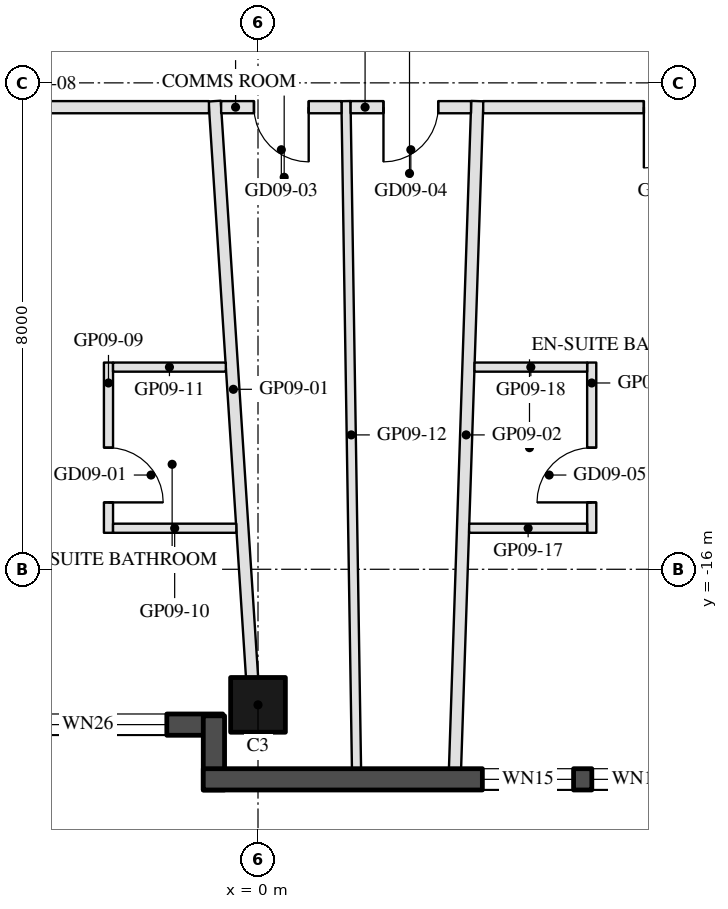
"""IFC4 building model, lengths in metres.
Left out: names, types, materials, properties, quantities, classifications, styles, units other than length and angle.
Written with IfcOpenShell. Run it as: python <this file> out.ifc"""

import sys

from ifc_helpers import new_model, si_unit, direction, frame, frame_2d, origin, origin_2d, place, context, subcontext, project, spatial, rectangle, hollow_rectangle, extrude, element, fill, save


model = new_model("IFC4")
c1 = context("Model", 3, precision=1e-05, world=origin(), true_north=direction((0.0, 1.0)))
c2 = subcontext(c1, "Body", "Model", "MODEL_VIEW")
j1 = project(units=[si_unit("LENGTHUNIT", "METRE"), si_unit("PLANEANGLEUNIT", "RADIAN")], contexts=[c1])
p1 = place(None, origin())
s1 = spatial("IfcSite", under=j1, at=p1, CompositionType="ELEMENT")
p2 = place(p1, origin())
s2 = spatial("IfcBuilding", under=s1, at=p2, CompositionType="ELEMENT")
p3 = place(p2, frame((0.0, 0.0, 113.1)))
s3 = spatial("IfcBuildingStorey", under=s2, at=p3, CompositionType="ELEMENT", Elevation=113.1)
p4 = place(p3, frame((0.0, -18.23, 0.0), z_axis=(0.0, 0.0, 1.0), x_axis=(-1.0, 0.0, 0.0)))
e1 = element("IfcColumn", 1, at=p4, inside=s3, PredefinedType="COLUMN", context=c2, shape_type="SweptSolid", body=[
    extrude(hollow_rectangle(XDim=0.9, YDim=0.9, WallThickness=0.04, at=origin_2d()), origin(), (0.0, 0.0, 1.0), 3.7),
])
p5 = place(p3, frame((-7.32, -18.555, 0.0), z_axis=(0.0, 0.0, 1.0), x_axis=(1.0, 0.0, 0.0)))
e2 = element("IfcWall", 2, at=p5, inside=s3, PredefinedType="SOLIDWALL", context=c2, shape_type="SweptSolid", body=[
    extrude(rectangle(XDim=6.74, YDim=0.35, at=frame_2d((3.37, 0.0))), origin(), (0.0, 0.0, 1.0), 3.55),
])
p6 = place(p5, frame((0.32, 0.0, 0.3)))
e3 = element("IfcOpeningElement", 3, at=p6, cuts=e2, PredefinedType="OPENING", context=c2, shape_type="SweptSolid", body=[
    extrude(rectangle(XDim=2.6, YDim=2.65, at=frame_2d((1.3, 1.325))), frame((0.0, 0.185, 0.0), z_axis=(0.0, -1.0, 0.0), x_axis=(1.0, 0.0, 0.0)), (0.0, 0.0, 1.0), 0.37),
])
p7 = place(p5, frame((3.22, 0.0, 0.3)))
e4 = element("IfcOpeningElement", 4, at=p7, cuts=e2, PredefinedType="OPENING", context=c2, shape_type="SweptSolid", body=[
    extrude(rectangle(XDim=2.6, YDim=2.65, at=frame_2d((1.3, 1.325))), frame((0.0, 0.185, 0.0), z_axis=(0.0, -1.0, 0.0), x_axis=(1.0, 0.0, 0.0)), (0.0, 0.0, 1.0), 0.37),
])
p8 = place(p3, frame((-0.725, -18.41, 0.0), z_axis=(0.0, 0.0, 1.0), x_axis=(0.0, -1.0, 0.0)))
e5 = element("IfcWall", 5, at=p8, inside=s3, PredefinedType="SOLIDWALL", context=c2, shape_type="SweptSolid", body=[
    extrude(rectangle(XDim=1.22, YDim=0.35, at=frame_2d((0.61, 0.0))), origin(), (0.0, 0.0, 1.0), 3.55),
])
p9 = place(p3, frame((-0.9, -19.455, 0.0), z_axis=(0.0, 0.0, 1.0), x_axis=(1.0, 0.0, 0.0)))
e6 = element("IfcWall", 6, at=p9, inside=s3, PredefinedType="SOLIDWALL", context=c2, shape_type="SweptSolid", body=[
    extrude(rectangle(XDim=9.7, YDim=0.35, at=frame_2d((4.85, 0.0))), origin(), (0.0, 0.0, 1.0), 3.55),
])
p10 = place(p9, frame((4.59, 0.0, 0.3)))
e7 = element("IfcOpeningElement", 7, at=p10, cuts=e6, PredefinedType="OPENING", context=c2, shape_type="SweptSolid", body=[
    extrude(rectangle(XDim=1.5, YDim=2.65, at=frame_2d((0.75, 1.325))), frame((0.0, 0.185, 0.0), z_axis=(0.0, -1.0, 0.0), x_axis=(1.0, 0.0, 0.0)), (0.0, 0.0, 1.0), 0.37),
])
p11 = place(p9, frame((6.39, 0.0, 0.3)))
e8 = element("IfcOpeningElement", 8, at=p11, cuts=e6, PredefinedType="OPENING", context=c2, shape_type="SweptSolid", body=[
    extrude(rectangle(XDim=1.5, YDim=2.65, at=frame_2d((0.75, 1.325))), frame((0.0, 0.185, 0.0), z_axis=(0.0, -1.0, 0.0), x_axis=(1.0, 0.0, 0.0)), (0.0, 0.0, 1.0), 0.37),
])
p12 = place(p3, frame((-0.097, -17.78, 0.0), z_axis=(0.0, 0.0, 1.0), x_axis=(-0.064787627283, 0.997899074732, 0.0)))
e9 = element("IfcWall", 9, at=p12, inside=s3, PredefinedType="PARTITIONING", context=c2, shape_type="SweptSolid", body=[
    extrude(rectangle(XDim=9.5, YDim=0.2, at=frame_2d((4.75, 0.0))), origin(), (0.0, 0.0, 1.0), 2.95),
])
p13 = place(p3, frame((3.24, -19.28, 0.0), z_axis=(0.0, 0.0, 1.0), x_axis=(0.033378464475, 0.99944278381, 0.0)))
e10 = element("IfcWall", 10, at=p13, inside=s3, PredefinedType="PARTITIONING", context=c2, shape_type="SweptSolid", body=[
    extrude(rectangle(XDim=10.986, YDim=0.2, at=frame_2d((5.493, 0.0))), origin(), (0.0, 0.0, 1.0), 2.96),
])
p14 = place(p3, frame((-0.807, -8.4, 0.0), z_axis=(0.0, 0.0, 1.0), x_axis=(-1.0, 0.0, 0.0)))
e11 = element("IfcWall", 11, at=p14, inside=s3, PredefinedType="PARTITIONING", context=c2, shape_type="SweptSolid", body=[
    extrude(rectangle(XDim=9.182, YDim=0.2, at=frame_2d((4.591, 0.0))), origin(), (0.0, 0.0, 1.0), 2.95),
])
p15 = place(p14, frame((4.091, 0.0, 0.0)))
e12 = element("IfcOpeningElement", 12, at=p15, cuts=e11, PredefinedType="OPENING", context=c2, shape_type="SweptSolid", body=[
    extrude(rectangle(XDim=1.0, YDim=2.1, at=frame_2d((0.5, 1.05))), frame((0.0, 0.11, 0.0), z_axis=(0.0, -1.0, 0.0), x_axis=(1.0, 0.0, 0.0)), (0.0, 0.0, 1.0), 0.22),
])
p16 = place(p3, frame((-2.459, -12.6, 0.0), z_axis=(0.0, 0.0, 1.0), x_axis=(0.0, -1.0, 0.0)))
e13 = element("IfcWall", 13, at=p16, inside=s3, PredefinedType="PARTITIONING", context=c2, shape_type="SweptSolid", body=[
    extrude(rectangle(XDim=2.8, YDim=0.15, at=frame_2d((1.4, 0.0))), origin(), (0.0, 0.0, 1.0), 3.55),
])
p17 = place(p16, frame((1.4, 0.0, 0.0)))
e14 = element("IfcOpeningElement", 14, at=p17, cuts=e13, PredefinedType="OPENING", context=c2, shape_type="SweptSolid", body=[
    extrude(rectangle(XDim=0.9, YDim=2.1, at=frame_2d((0.45, 1.05))), frame((0.0, 0.085, 0.0), z_axis=(0.0, -1.0, 0.0), x_axis=(1.0, 0.0, 0.0)), (0.0, 0.0, 1.0), 0.17),
])
p18 = place(p3, frame((-2.384, -15.325, 0.0), z_axis=(0.0, 0.0, 1.0), x_axis=(1.0, 0.0, 0.0)))
e15 = element("IfcWall", 15, at=p18, inside=s3, PredefinedType="PARTITIONING", context=c2, shape_type="SweptSolid", body=[
    extrude(rectangle(XDim=2.027, YDim=0.15, at=frame_2d((1.014, 0.0))), origin(), (0.0, 0.0, 1.0), 3.55),
])
p19 = place(p3, frame((-2.384, -12.675, 0.0), z_axis=(0.0, 0.0, 1.0), x_axis=(1.0, 0.0, 0.0)))
e16 = element("IfcWall", 16, at=p19, inside=s3, PredefinedType="PARTITIONING", context=c2, shape_type="SweptSolid", body=[
    extrude(rectangle(XDim=1.855, YDim=0.15, at=frame_2d((0.927, 0.0))), origin(), (0.0, 0.0, 1.0), 3.55),
])
p20 = place(p3, frame((1.62, -19.28, 0.0), z_axis=(0.0, 0.0, 1.0), x_axis=(-0.015784932211, 0.999875410196, 0.0)))
e17 = element("IfcWall", 17, at=p20, inside=s3, PredefinedType="PARTITIONING", context=c2, shape_type="SweptSolid", body=[
    extrude(rectangle(XDim=10.981, YDim=0.15, at=frame_2d((5.491, 0.0))), origin(), (0.0, 0.0, 1.0), 2.96),
])
p21 = place(p3, frame((1.373, -8.4, 0.0), z_axis=(0.0, 0.0, 1.0), x_axis=(-1.0, 0.0, 0.0)))
e18 = element("IfcWall", 18, at=p21, inside=s3, PredefinedType="PARTITIONING", context=c2, shape_type="SweptSolid", body=[
    extrude(rectangle(XDim=1.979, YDim=0.2, at=frame_2d((0.99, 0.0))), origin(), (0.0, 0.0, 1.0), 2.95),
])
p22 = place(p21, frame((0.54, 0.0, 0.0)))
e19 = element("IfcOpeningElement", 19, at=p22, cuts=e18, PredefinedType="OPENING", context=c2, shape_type="SweptSolid", body=[
    extrude(rectangle(XDim=0.9, YDim=2.1, at=frame_2d((0.45, 1.05))), frame((0.0, 0.11, 0.0), z_axis=(0.0, -1.0, 0.0), x_axis=(1.0, 0.0, 0.0)), (0.0, 0.0, 1.0), 0.22),
])
p23 = place(p3, frame((3.503, -8.4, 0.0), z_axis=(0.0, 0.0, 1.0), x_axis=(-1.0, 0.0, 0.0)))
e20 = element("IfcWall", 20, at=p23, inside=s3, PredefinedType="PARTITIONING", context=c2, shape_type="SweptSolid", body=[
    extrude(rectangle(XDim=1.98, YDim=0.2, at=frame_2d((0.99, 0.0))), origin(), (0.0, 0.0, 1.0), 3.55),
])
p24 = place(p23, frame((0.54, 0.0, 0.0)))
e21 = element("IfcOpeningElement", 21, at=p24, cuts=e20, PredefinedType="OPENING", context=c2, shape_type="SweptSolid", body=[
    extrude(rectangle(XDim=0.9, YDim=2.1, at=frame_2d((0.45, 1.05))), frame((0.0, 0.11, 0.0), z_axis=(0.0, -1.0, 0.0), x_axis=(1.0, 0.0, 0.0)), (0.0, 0.0, 1.0), 0.22),
])
p25 = place(p3, frame((9.988, -8.4, 0.0), z_axis=(0.0, 0.0, 1.0), x_axis=(-1.0, 0.0, 0.0)))
e22 = element("IfcWall", 22, at=p25, inside=s3, PredefinedType="PARTITIONING", context=c2, shape_type="SweptSolid", body=[
    extrude(rectangle(XDim=6.285, YDim=0.2, at=frame_2d((3.143, 0.0))), origin(), (0.0, 0.0, 1.0), 2.95),
])
p26 = place(p25, frame((2.642, 0.0, 0.0)))
e23 = element("IfcOpeningElement", 23, at=p26, cuts=e22, PredefinedType="OPENING", context=c2, shape_type="SweptSolid", body=[
    extrude(rectangle(XDim=1.0, YDim=2.1, at=frame_2d((0.5, 1.05))), frame((0.0, 0.11, 0.0), z_axis=(0.0, -1.0, 0.0), x_axis=(1.0, 0.0, 0.0)), (0.0, 0.0, 1.0), 0.22),
])
p27 = place(p3, frame((5.488, -15.4, 0.0), z_axis=(0.0, 0.0, 1.0), x_axis=(0.0, 1.0, 0.0)))
e24 = element("IfcWall", 24, at=p27, inside=s3, PredefinedType="PARTITIONING", context=c2, shape_type="SweptSolid", body=[
    extrude(rectangle(XDim=2.8, YDim=0.15, at=frame_2d((1.4, 0.0))), origin(), (0.0, 0.0, 1.0), 3.55),
])
p28 = place(p27, frame((0.5, 0.0, 0.0)))
e25 = element("IfcOpeningElement", 25, at=p28, cuts=e24, PredefinedType="OPENING", context=c2, shape_type="SweptSolid", body=[
    extrude(rectangle(XDim=0.9, YDim=2.1, at=frame_2d((0.45, 1.05))), frame((0.0, 0.085, 0.0), z_axis=(0.0, -1.0, 0.0), x_axis=(1.0, 0.0, 0.0)), (0.0, 0.0, 1.0), 0.17),
])
p29 = place(p3, frame((3.472, -15.325, 0.0), z_axis=(0.0, 0.0, 1.0), x_axis=(1.0, 0.0, 0.0)))
e26 = element("IfcWall", 26, at=p29, inside=s3, PredefinedType="PARTITIONING", context=c2, shape_type="SweptSolid", body=[
    extrude(rectangle(XDim=1.941, YDim=0.15, at=frame_2d((0.97, 0.0))), origin(), (0.0, 0.0, 1.0), 2.95),
])
p30 = place(p3, frame((3.561, -12.675, 0.0), z_axis=(0.0, 0.0, 1.0), x_axis=(1.0, 0.0, 0.0)))
e27 = element("IfcWall", 27, at=p30, inside=s3, PredefinedType="PARTITIONING", context=c2, shape_type="SweptSolid", body=[
    extrude(rectangle(XDim=1.853, YDim=0.15, at=frame_2d((0.926, 0.0))), origin(), (0.0, 0.0, 1.0), 2.95),
])
p31 = place(p7, origin())
e28 = element("IfcWindow", 28, at=p31, inside=s3, PartitioningType="SINGLE_PANEL", PredefinedType="WINDOW", context=c2, shape_type="SweptSolid", body=[
    extrude(rectangle(XDim=2.6, YDim=2.65, at=frame_2d((1.3, 1.325))), frame((0.0, 0.03, 0.0), z_axis=(0.0, -1.0, 0.0), x_axis=(1.0, 0.0, 0.0)), (0.0, 0.0, 1.0), 0.06),
])
fill(e4, e28)
p32 = place(p10, origin())
e29 = element("IfcWindow", 29, at=p32, inside=s3, PartitioningType="SINGLE_PANEL", PredefinedType="WINDOW", context=c2, shape_type="SweptSolid", body=[
    extrude(rectangle(XDim=1.5, YDim=2.65, at=frame_2d((0.75, 1.325))), frame((0.0, 0.03, 0.0), z_axis=(0.0, -1.0, 0.0), x_axis=(1.0, 0.0, 0.0)), (0.0, 0.0, 1.0), 0.06),
])
fill(e7, e29)
p33 = place(p11, origin())
e30 = element("IfcWindow", 30, at=p33, inside=s3, PartitioningType="SINGLE_PANEL", PredefinedType="WINDOW", context=c2, shape_type="SweptSolid", body=[
    extrude(rectangle(XDim=1.5, YDim=2.65, at=frame_2d((0.75, 1.325))), frame((0.0, 0.03, 0.0), z_axis=(0.0, -1.0, 0.0), x_axis=(1.0, 0.0, 0.0)), (0.0, 0.0, 1.0), 0.06),
])
fill(e8, e30)
p34 = place(p17, origin())
e31 = element("IfcDoor", 31, at=p34, inside=s3, OperationType="SINGLE_SWING_RIGHT", PredefinedType="DOOR", context=c2, shape_type="SweptSolid", body=[
    extrude(rectangle(XDim=0.9, YDim=2.1, at=frame_2d((0.45, 1.05))), frame((0.0, 0.025, 0.0), z_axis=(0.0, -1.0, 0.0), x_axis=(1.0, 0.0, 0.0)), (0.0, 0.0, 1.0), 0.05),
])
fill(e14, e31)
p35 = place(p22, origin())
e32 = element("IfcDoor", 32, at=p35, inside=s3, OperationType="SINGLE_SWING_LEFT", PredefinedType="DOOR", context=c2, shape_type="SweptSolid", body=[
    extrude(rectangle(XDim=0.9, YDim=2.1, at=frame_2d((0.45, 1.05))), frame((0.0, 0.025, 0.0), z_axis=(0.0, -1.0, 0.0), x_axis=(1.0, 0.0, 0.0)), (0.0, 0.0, 1.0), 0.05),
])
fill(e19, e32)
p36 = place(p24, origin())
e33 = element("IfcDoor", 33, at=p36, inside=s3, OperationType="SINGLE_SWING_RIGHT", PredefinedType="DOOR", context=c2, shape_type="SweptSolid", body=[
    extrude(rectangle(XDim=0.9, YDim=2.1, at=frame_2d((0.45, 1.05))), frame((0.0, 0.025, 0.0), z_axis=(0.0, -1.0, 0.0), x_axis=(1.0, 0.0, 0.0)), (0.0, 0.0, 1.0), 0.05),
])
fill(e21, e33)
p37 = place(p28, origin())
e34 = element("IfcDoor", 34, at=p37, inside=s3, OperationType="SINGLE_SWING_LEFT", PredefinedType="DOOR", context=c2, shape_type="SweptSolid", body=[
    extrude(rectangle(XDim=0.9, YDim=2.1, at=frame_2d((0.45, 1.05))), frame((0.0, 0.025, 0.0), z_axis=(0.0, -1.0, 0.0), x_axis=(1.0, 0.0, 0.0)), (0.0, 0.0, 1.0), 0.05),
])
fill(e25, e34)
p38 = place(p26, origin())
e35 = element("IfcDoor", 35, at=p38, inside=s3, OperationType="SINGLE_SWING_RIGHT", PredefinedType="DOOR", context=c2, shape_type="SweptSolid", body=[
    extrude(rectangle(XDim=1.0, YDim=2.1, at=frame_2d((0.5, 1.05))), frame((0.0, 0.025, 0.0), z_axis=(0.0, -1.0, 0.0), x_axis=(1.0, 0.0, 0.0)), (0.0, 0.0, 1.0), 0.05),
])
fill(e23, e35)
save(model, sys.argv[1])
